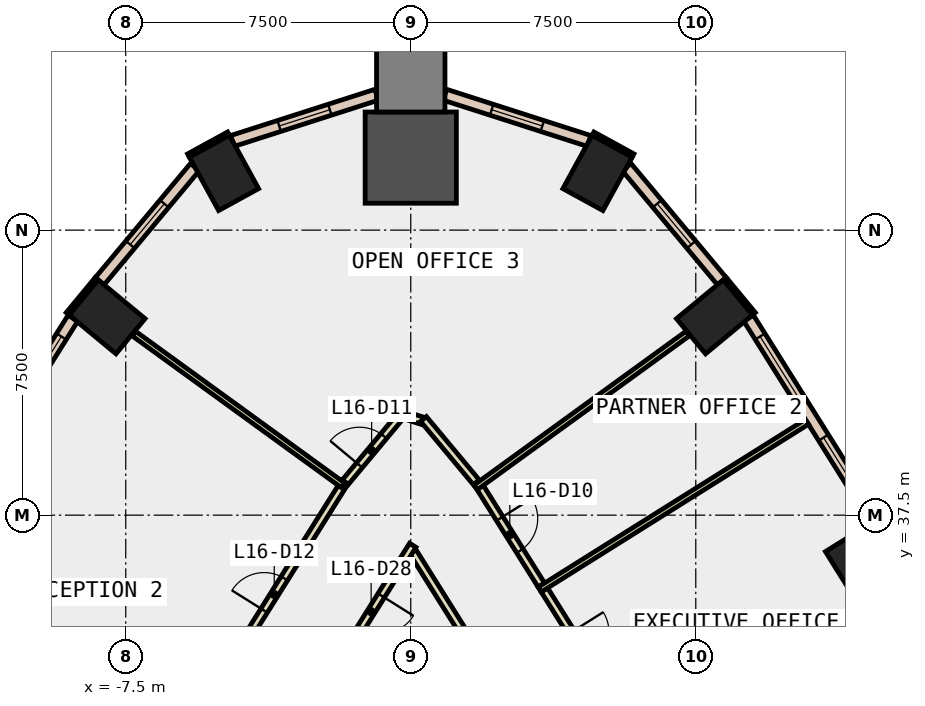
"""IFC4 building model, lengths in metres.
Left out: names, types, materials, properties, quantities, classifications, styles, units other than length and angle.
Written with IfcOpenShell. Run it as: python <this file> out.ifc"""

import sys

from ifc_helpers import new_model, si_unit, direction, frame, frame_2d, origin, origin_2d, place, context, subcontext, project, spatial, rectangle, extrude, element, fill, save


model = new_model("IFC4")
c1 = context("Model", 3, precision=1e-05, world=origin(), true_north=direction((0.0, 1.0)))
c2 = subcontext(c1, "Body", "Model", "MODEL_VIEW")
j1 = project(units=[si_unit("LENGTHUNIT", "METRE"), si_unit("PLANEANGLEUNIT", "RADIAN")], contexts=[c1])
p1 = place(None, origin())
s1 = spatial("IfcSite", under=j1, at=p1, CompositionType="ELEMENT")
p2 = place(p1, origin())
s2 = spatial("IfcBuilding", under=s1, at=p2, CompositionType="ELEMENT")
p3 = place(p2, frame((0.0, 0.0, 77.0)))
s3 = spatial("IfcBuildingStorey", under=s2, at=p3, CompositionType="ELEMENT", Elevation=77.0)
for number, where, z_axis, x_axis in (
    (1, (11.909, 36.457, -0.4), (0.0, 0.0, 1.0), (-0.53, 0.848, 0.0)),
    (2, (7.991, 42.718, -0.4), (0.0, 0.0, 1.0), (-0.638, 0.77, 0.0)),
    (3, (4.914, 46.505, -0.4), (0.0, 0.0, 1.0), (-0.877, 0.48, 0.0)),
):
    element("IfcColumn", number, at=place(p3, frame(where, z_axis=z_axis, x_axis=x_axis)), inside=s3, PredefinedType="COLUMN", context=c2, shape_type="SweptSolid", body=[
        extrude(rectangle(XDim=1.2, YDim=1.6, at=origin_2d()), origin(), (0.0, 0.0, 1.0), 4.0),
    ])
p4 = place(p3, frame((0.0, 46.908, -0.4), z_axis=(0.0, 0.0, 1.0), x_axis=(0.0, 1.0, 0.0)))
e4 = element("IfcColumn", 4, at=p4, inside=s3, PredefinedType="COLUMN", context=c2, shape_type="SweptSolid", body=[
    extrude(rectangle(XDim=2.4, YDim=2.4, at=origin_2d()), origin(), (0.0, 0.0, 1.0), 4.0),
])
for number, where, z_axis, x_axis in (
    (5, (-4.914, 46.505, -0.4), (0.0, 0.0, 1.0), (0.877, 0.48, 0.0)),
    (6, (-7.991, 42.718, -0.4), (0.0, 0.0, 1.0), (0.638, 0.77, 0.0)),
):
    element("IfcColumn", number, at=place(p3, frame(where, z_axis=z_axis, x_axis=x_axis)), inside=s3, PredefinedType="COLUMN", context=c2, shape_type="SweptSolid", body=[
        extrude(rectangle(XDim=1.2, YDim=1.6, at=origin_2d()), origin(), (0.0, 0.0, 1.0), 4.0),
    ])
p5 = place(p3, frame((0.0, 49.008, -0.4), z_axis=(0.0, 0.0, 1.0), x_axis=(0.0, 1.0, 0.0)))
e7 = element("IfcColumn", 7, at=p5, inside=s3, PredefinedType="COLUMN", context=c2, shape_type="SweptSolid", body=[
    extrude(rectangle(XDim=1.8, YDim=1.8, at=origin_2d()), origin(), (0.0, 0.0, 1.0), 4.0),
])
for number, where, z_axis, x_axis in (
    (8, (5.848, 46.962, 0.0), (0.0, 0.0, 1.0), (-0.877, 0.48, 0.0)),
    (9, (-4.796, 47.538, 0.0), (0.0, 0.0, 1.0), (-0.877, -0.48, 0.0)),
    (10, (9.028, 42.798, 0.0), (0.0, 0.0, 1.0), (-0.638, 0.77, 0.0)),
    (11, (-8.263, 43.722, 0.0), (0.0, 0.0, 1.0), (-0.638, -0.77, 0.0)),
):
    element("IfcWall", number, at=place(p3, frame(where, z_axis=z_axis, x_axis=x_axis)), inside=s3, PredefinedType="STANDARD", context=c2, shape_type="SweptSolid", body=[
        extrude(rectangle(XDim=1.199, YDim=0.1, at=frame_2d((0.6, 0.0))), origin(), (0.0, 0.0, 1.0), 3.6),
    ])
p6 = place(p3, frame((12.227, 37.362, 0.0), z_axis=(0.0, 0.0, 1.0), x_axis=(-0.531357111884, 0.847147932565, 0.0)))
e12 = element("IfcWall", 12, at=p6, inside=s3, PredefinedType="STANDARD", context=c2, shape_type="SweptSolid", body=[
    extrude(rectangle(XDim=6.282, YDim=0.3, at=frame_2d((3.141, 0.0))), origin(), (0.0, 0.0, 1.0), 3.6),
])
p7 = place(p6, frame((0.571, 0.0, 0.9)))
e13 = element("IfcOpeningElement", 13, at=p7, cuts=e12, PredefinedType="OPENING", context=c2, shape_type="SweptSolid", body=[
    extrude(rectangle(XDim=2.0, YDim=2.6, at=frame_2d((1.0, 1.3))), frame((0.0, 0.16, 0.0), z_axis=(0.0, -1.0, 0.0), x_axis=(1.0, 0.0, 0.0)), (0.0, 0.0, 1.0), 0.32),
])
p8 = place(p6, frame((3.712, 0.0, 0.9)))
e14 = element("IfcOpeningElement", 14, at=p8, cuts=e12, PredefinedType="OPENING", context=c2, shape_type="SweptSolid", body=[
    extrude(rectangle(XDim=2.0, YDim=2.6, at=frame_2d((1.0, 1.3))), frame((0.0, 0.16, 0.0), z_axis=(0.0, -1.0, 0.0), x_axis=(1.0, 0.0, 0.0)), (0.0, 0.0, 1.0), 0.32),
])
p9 = place(p3, frame((8.185, 43.656, 0.0), z_axis=(0.0, 0.0, 1.0), x_axis=(-0.640565172846, 0.767903808649, 0.0)))
e15 = element("IfcWall", 15, at=p9, inside=s3, PredefinedType="STANDARD", context=c2, shape_type="SweptSolid", body=[
    extrude(rectangle(XDim=3.909, YDim=0.3, at=frame_2d((1.955, 0.0))), origin(), (0.0, 0.0, 1.0), 3.6),
])
p10 = place(p9, frame((1.255, 0.0, 0.9)))
e16 = element("IfcOpeningElement", 16, at=p10, cuts=e15, PredefinedType="OPENING", context=c2, shape_type="SweptSolid", body=[
    extrude(rectangle(XDim=1.4, YDim=2.6, at=frame_2d((0.7, 1.3))), frame((0.0, 0.16, 0.0), z_axis=(0.0, -1.0, 0.0), x_axis=(1.0, 0.0, 0.0)), (0.0, 0.0, 1.0), 0.32),
])
p11 = place(p3, frame((4.692, 47.346, 0.0), z_axis=(0.0, 0.0, 1.0), x_axis=(-0.95225533311, 0.30530276868, 0.0)))
e17 = element("IfcWall", 17, at=p11, inside=s3, PredefinedType="STANDARD", context=c2, shape_type="SweptSolid", body=[
    extrude(rectangle(XDim=3.983, YDim=0.3, at=frame_2d((1.992, 0.0))), origin(), (0.0, 0.0, 1.0), 3.6),
])
p12 = place(p11, frame((1.292, 0.0, 0.9)))
e18 = element("IfcOpeningElement", 18, at=p12, cuts=e17, PredefinedType="OPENING", context=c2, shape_type="SweptSolid", body=[
    extrude(rectangle(XDim=1.4, YDim=2.6, at=frame_2d((0.7, 1.3))), frame((0.0, 0.16, 0.0), z_axis=(0.0, -1.0, 0.0), x_axis=(1.0, 0.0, 0.0)), (0.0, 0.0, 1.0), 0.32),
])
p13 = place(p3, frame((-0.899, 48.562, 0.0), z_axis=(0.0, 0.0, 1.0), x_axis=(-0.95225533311, -0.30530276868, 0.0)))
e19 = element("IfcWall", 19, at=p13, inside=s3, PredefinedType="STANDARD", context=c2, shape_type="SweptSolid", body=[
    extrude(rectangle(XDim=3.983, YDim=0.3, at=frame_2d((1.992, 0.0))), origin(), (0.0, 0.0, 1.0), 3.6),
])
p14 = place(p13, frame((1.292, 0.0, 0.9)))
e20 = element("IfcOpeningElement", 20, at=p14, cuts=e19, PredefinedType="OPENING", context=c2, shape_type="SweptSolid", body=[
    extrude(rectangle(XDim=1.4, YDim=2.6, at=frame_2d((0.7, 1.3))), frame((0.0, 0.16, 0.0), z_axis=(0.0, -1.0, 0.0), x_axis=(1.0, 0.0, 0.0)), (0.0, 0.0, 1.0), 0.32),
])
p15 = place(p3, frame((-5.681, 46.658, 0.0), z_axis=(0.0, 0.0, 1.0), x_axis=(-0.640565172846, -0.767903808649, 0.0)))
e21 = element("IfcWall", 21, at=p15, inside=s3, PredefinedType="STANDARD", context=c2, shape_type="SweptSolid", body=[
    extrude(rectangle(XDim=3.909, YDim=0.3, at=frame_2d((1.955, 0.0))), origin(), (0.0, 0.0, 1.0), 3.6),
])
p16 = place(p15, frame((1.255, 0.0, 0.9)))
e22 = element("IfcOpeningElement", 22, at=p16, cuts=e21, PredefinedType="OPENING", context=c2, shape_type="SweptSolid", body=[
    extrude(rectangle(XDim=1.4, YDim=2.6, at=frame_2d((0.7, 1.3))), frame((0.0, 0.16, 0.0), z_axis=(0.0, -1.0, 0.0), x_axis=(1.0, 0.0, 0.0)), (0.0, 0.0, 1.0), 0.32),
])
p17 = place(p3, frame((-8.889, 42.684, 0.0), z_axis=(0.0, 0.0, 1.0), x_axis=(-0.531357111884, -0.847147932565, 0.0)))
e23 = element("IfcWall", 23, at=p17, inside=s3, PredefinedType="STANDARD", context=c2, shape_type="SweptSolid", body=[
    extrude(rectangle(XDim=6.282, YDim=0.3, at=frame_2d((3.141, 0.0))), origin(), (0.0, 0.0, 1.0), 3.6),
])
p18 = place(p17, frame((0.571, 0.0, 0.9)))
e24 = element("IfcOpeningElement", 24, at=p18, cuts=e23, PredefinedType="OPENING", context=c2, shape_type="SweptSolid", body=[
    extrude(rectangle(XDim=2.0, YDim=2.6, at=frame_2d((1.0, 1.3))), frame((0.0, 0.16, 0.0), z_axis=(0.0, -1.0, 0.0), x_axis=(1.0, 0.0, 0.0)), (0.0, 0.0, 1.0), 0.32),
])
p19 = place(p17, frame((3.712, 0.0, 0.9)))
e25 = element("IfcOpeningElement", 25, at=p19, cuts=e23, PredefinedType="OPENING", context=c2, shape_type="SweptSolid", body=[
    extrude(rectangle(XDim=2.0, YDim=2.6, at=frame_2d((1.0, 1.3))), frame((0.0, 0.16, 0.0), z_axis=(0.0, -1.0, 0.0), x_axis=(1.0, 0.0, 0.0)), (0.0, 0.0, 1.0), 0.32),
])
p20 = place(p3, frame((2.031, 33.385, 0.0), z_axis=(0.0, 0.0, 1.0), x_axis=(-0.53130100335, 0.847183122967, 0.0)))
e26 = element("IfcWall", 26, at=p20, inside=s3, PredefinedType="PARTITIONING", context=c2, shape_type="SweptSolid", body=[
    extrude(rectangle(XDim=3.723, YDim=0.2, at=frame_2d((1.861, 0.0))), origin(), (0.0, 0.0, 1.0), 3.6),
])
p21 = place(p3, frame((0.053, 36.708, 0.0), z_axis=(0.0, 0.0, 1.0), x_axis=(-0.53130190932, -0.847182554797, 0.0)))
e27 = element("IfcWall", 27, at=p21, inside=s3, PredefinedType="PARTITIONING", context=c2, shape_type="SweptSolid", body=[
    extrude(rectangle(XDim=3.922, YDim=0.2, at=frame_2d((1.961, 0.0))), origin(), (0.0, 0.0, 1.0), 3.6),
])
p22 = place(p21, frame((1.562, 0.0, 0.0)))
e28 = element("IfcOpeningElement", 28, at=p22, cuts=e27, PredefinedType="OPENING", context=c2, shape_type="SweptSolid", body=[
    extrude(rectangle(XDim=1.0, YDim=2.1, at=frame_2d((0.5, 1.05))), frame((0.0, 0.11, 0.0), z_axis=(0.0, -1.0, 0.0), x_axis=(1.0, 0.0, 0.0)), (0.0, 0.0, 1.0), 0.22),
])
p23 = place(p3, frame((3.517, 35.533, 0.0), z_axis=(0.0, 0.0, 1.0), x_axis=(0.531301282969, -0.847182947607, 0.0)))
e29 = element("IfcWall", 29, at=p23, inside=s3, PredefinedType="PARTITIONING", context=c2, shape_type="SweptSolid", body=[
    extrude(rectangle(XDim=3.638, YDim=0.2, at=frame_2d((1.819, 0.0))), origin(), (0.0, 0.0, 1.0), 3.6),
])
p24 = place(p23, frame((1.319, 0.0, 0.0)))
e30 = element("IfcOpeningElement", 30, at=p24, cuts=e29, PredefinedType="OPENING", context=c2, shape_type="SweptSolid", body=[
    extrude(rectangle(XDim=1.0, YDim=2.1, at=frame_2d((0.5, 1.05))), frame((0.0, 0.11, 0.0), z_axis=(0.0, -1.0, 0.0), x_axis=(1.0, 0.0, 0.0)), (0.0, 0.0, 1.0), 0.22),
])
p25 = place(p3, frame((1.775, 38.31, 0.0), z_axis=(0.0, 0.0, 1.0), x_axis=(0.531324164807, -0.847168597088, 0.0)))
e31 = element("IfcWall", 31, at=p25, inside=s3, PredefinedType="PARTITIONING", context=c2, shape_type="SweptSolid", body=[
    extrude(rectangle(XDim=3.128, YDim=0.2, at=frame_2d((1.564, 0.0))), origin(), (0.0, 0.0, 1.0), 3.6),
])
p26 = place(p25, frame((1.064, 0.0, 0.0)))
e32 = element("IfcOpeningElement", 32, at=p26, cuts=e31, PredefinedType="OPENING", context=c2, shape_type="SweptSolid", body=[
    extrude(rectangle(XDim=1.0, YDim=2.1, at=frame_2d((0.5, 1.05))), frame((0.0, 0.11, 0.0), z_axis=(0.0, -1.0, 0.0), x_axis=(1.0, 0.0, 0.0)), (0.0, 0.0, 1.0), 0.22),
])
p27 = place(p3, frame((-1.724, 38.365, 0.0), z_axis=(0.0, 0.0, 1.0), x_axis=(0.64036162185, 0.768073559799, 0.0)))
e33 = element("IfcWall", 33, at=p27, inside=s3, PredefinedType="PARTITIONING", context=c2, shape_type="SweptSolid", body=[
    extrude(rectangle(XDim=2.168, YDim=0.2, at=frame_2d((1.084, 0.0))), origin(), (0.0, 0.0, 1.0), 3.6),
])
p28 = place(p27, frame((0.584, 0.0, 0.0)))
e34 = element("IfcOpeningElement", 34, at=p28, cuts=e33, PredefinedType="OPENING", context=c2, shape_type="SweptSolid", body=[
    extrude(rectangle(XDim=1.0, YDim=2.1, at=frame_2d((0.5, 1.05))), frame((0.0, 0.11, 0.0), z_axis=(0.0, -1.0, 0.0), x_axis=(1.0, 0.0, 0.0)), (0.0, 0.0, 1.0), 0.22),
])
p29 = place(p3, frame((-0.095, 40.112, 0.0), z_axis=(0.0, 0.0, 1.0), x_axis=(0.952282288042, -0.305218682065, 0.0)))
e35 = element("IfcWall", 35, at=p29, inside=s3, PredefinedType="PARTITIONING", context=c2, shape_type="SweptSolid", body=[
    extrude(rectangle(XDim=0.42, YDim=0.2, at=frame_2d((0.21, 0.0))), origin(), (0.0, 0.0, 1.0), 3.6),
])
p30 = place(p3, frame((0.336, 40.03, 0.0), z_axis=(0.0, 0.0, 1.0), x_axis=(0.64036162185, -0.768073559799, 0.0)))
e36 = element("IfcWall", 36, at=p30, inside=s3, PredefinedType="PARTITIONING", context=c2, shape_type="SweptSolid", body=[
    extrude(rectangle(XDim=2.168, YDim=0.2, at=frame_2d((1.084, 0.0))), origin(), (0.0, 0.0, 1.0), 3.6),
])
p31 = place(p3, frame((-5.45, 32.451, 0.0), z_axis=(0.0, 0.0, 1.0), x_axis=(0.531388870359, 0.847128011849, 0.0)))
e37 = element("IfcWall", 37, at=p31, inside=s3, PredefinedType="PARTITIONING", context=c2, shape_type="SweptSolid", body=[
    extrude(rectangle(XDim=6.991, YDim=0.2, at=frame_2d((3.495, 0.0))), origin(), (0.0, 0.0, 1.0), 3.6),
])
p32 = place(p31, frame((2.996, 0.0, 0.0)))
e38 = element("IfcOpeningElement", 38, at=p32, cuts=e37, PredefinedType="OPENING", context=c2, shape_type="SweptSolid", body=[
    extrude(rectangle(XDim=1.0, YDim=2.1, at=frame_2d((0.5, 1.05))), frame((0.0, 0.11, 0.0), z_axis=(0.0, -1.0, 0.0), x_axis=(1.0, 0.0, 0.0)), (0.0, 0.0, 1.0), 0.22),
])
p33 = place(p3, frame((3.393, 35.543, 0.0), z_axis=(0.0, 0.0, 1.0), x_axis=(0.847089858839, 0.531449688166, 0.0)))
e39 = element("IfcWall", 39, at=p33, inside=s3, PredefinedType="PARTITIONING", context=c2, shape_type="SweptSolid", body=[
    extrude(rectangle(XDim=8.3, YDim=0.15, at=frame_2d((4.15, 0.0))), origin(), (0.0, 0.0, 1.0), 3.6),
])
p34 = place(p3, frame((1.708, 38.23, 0.0), z_axis=(0.0, 0.0, 1.0), x_axis=(0.809349578957, 0.58732721633, 0.0)))
e40 = element("IfcWall", 40, at=p34, inside=s3, PredefinedType="PARTITIONING", context=c2, shape_type="SweptSolid", body=[
    extrude(rectangle(XDim=6.896, YDim=0.15, at=frame_2d((3.448, 0.0))), origin(), (0.0, 0.0, 1.0), 3.6),
])
p35 = place(p3, frame((-1.788, 38.289, 0.0), z_axis=(0.0, 0.0, 1.0), x_axis=(-0.809417495555, 0.587233614408, 0.0)))
e41 = element("IfcWall", 41, at=p35, inside=s3, PredefinedType="PARTITIONING", context=c2, shape_type="SweptSolid", body=[
    extrude(rectangle(XDim=6.796, YDim=0.15, at=frame_2d((3.398, 0.0))), origin(), (0.0, 0.0, 1.0), 3.6),
])
p36 = place(p7, origin())
e42 = element("IfcWindow", 42, at=p36, inside=s3, PartitioningType="SINGLE_PANEL", PredefinedType="WINDOW", context=c2, shape_type="SweptSolid", body=[
    extrude(rectangle(XDim=2.0, YDim=2.6, at=frame_2d((1.0, 1.3))), frame((0.0, 0.03, 0.0), z_axis=(0.0, -1.0, 0.0), x_axis=(1.0, 0.0, 0.0)), (0.0, 0.0, 1.0), 0.06),
])
fill(e13, e42)
p37 = place(p8, origin())
e43 = element("IfcWindow", 43, at=p37, inside=s3, PartitioningType="SINGLE_PANEL", PredefinedType="WINDOW", context=c2, shape_type="SweptSolid", body=[
    extrude(rectangle(XDim=2.0, YDim=2.6, at=frame_2d((1.0, 1.3))), frame((0.0, 0.03, 0.0), z_axis=(0.0, -1.0, 0.0), x_axis=(1.0, 0.0, 0.0)), (0.0, 0.0, 1.0), 0.06),
])
fill(e14, e43)
p38 = place(p10, origin())
e44 = element("IfcWindow", 44, at=p38, inside=s3, PartitioningType="SINGLE_PANEL", PredefinedType="WINDOW", context=c2, shape_type="SweptSolid", body=[
    extrude(rectangle(XDim=1.4, YDim=2.6, at=frame_2d((0.7, 1.3))), frame((0.0, 0.03, 0.0), z_axis=(0.0, -1.0, 0.0), x_axis=(1.0, 0.0, 0.0)), (0.0, 0.0, 1.0), 0.06),
])
fill(e16, e44)
p39 = place(p12, origin())
e45 = element("IfcWindow", 45, at=p39, inside=s3, PartitioningType="SINGLE_PANEL", PredefinedType="WINDOW", context=c2, shape_type="SweptSolid", body=[
    extrude(rectangle(XDim=1.4, YDim=2.6, at=frame_2d((0.7, 1.3))), frame((0.0, 0.03, 0.0), z_axis=(0.0, -1.0, 0.0), x_axis=(1.0, 0.0, 0.0)), (0.0, 0.0, 1.0), 0.06),
])
fill(e18, e45)
p40 = place(p14, origin())
e46 = element("IfcWindow", 46, at=p40, inside=s3, PartitioningType="SINGLE_PANEL", PredefinedType="WINDOW", context=c2, shape_type="SweptSolid", body=[
    extrude(rectangle(XDim=1.4, YDim=2.6, at=frame_2d((0.7, 1.3))), frame((0.0, 0.03, 0.0), z_axis=(0.0, -1.0, 0.0), x_axis=(1.0, 0.0, 0.0)), (0.0, 0.0, 1.0), 0.06),
])
fill(e20, e46)
p41 = place(p16, origin())
e47 = element("IfcWindow", 47, at=p41, inside=s3, PartitioningType="SINGLE_PANEL", PredefinedType="WINDOW", context=c2, shape_type="SweptSolid", body=[
    extrude(rectangle(XDim=1.4, YDim=2.6, at=frame_2d((0.7, 1.3))), frame((0.0, 0.03, 0.0), z_axis=(0.0, -1.0, 0.0), x_axis=(1.0, 0.0, 0.0)), (0.0, 0.0, 1.0), 0.06),
])
fill(e22, e47)
p42 = place(p18, origin())
e48 = element("IfcWindow", 48, at=p42, inside=s3, PartitioningType="SINGLE_PANEL", PredefinedType="WINDOW", context=c2, shape_type="SweptSolid", body=[
    extrude(rectangle(XDim=2.0, YDim=2.6, at=frame_2d((1.0, 1.3))), frame((0.0, 0.03, 0.0), z_axis=(0.0, -1.0, 0.0), x_axis=(1.0, 0.0, 0.0)), (0.0, 0.0, 1.0), 0.06),
])
fill(e24, e48)
p43 = place(p26, origin())
e49 = element("IfcDoor", 49, at=p43, inside=s3, OperationType="SINGLE_SWING_LEFT", PredefinedType="DOOR", context=c2, shape_type="SweptSolid", body=[
    extrude(rectangle(XDim=1.0, YDim=2.1, at=frame_2d((0.5, 1.05))), frame((0.0, 0.025, 0.0), z_axis=(0.0, -1.0, 0.0), x_axis=(1.0, 0.0, 0.0)), (0.0, 0.0, 1.0), 0.05),
])
fill(e32, e49)
p44 = place(p28, origin())
e50 = element("IfcDoor", 50, at=p44, inside=s3, OperationType="SINGLE_SWING_LEFT", PredefinedType="DOOR", context=c2, shape_type="SweptSolid", body=[
    extrude(rectangle(XDim=1.0, YDim=2.1, at=frame_2d((0.5, 1.05))), frame((0.0, 0.025, 0.0), z_axis=(0.0, -1.0, 0.0), x_axis=(1.0, 0.0, 0.0)), (0.0, 0.0, 1.0), 0.05),
])
fill(e34, e50)
p45 = place(p32, origin())
e51 = element("IfcDoor", 51, at=p45, inside=s3, OperationType="SINGLE_SWING_LEFT", PredefinedType="DOOR", context=c2, shape_type="SweptSolid", body=[
    extrude(rectangle(XDim=1.0, YDim=2.1, at=frame_2d((0.5, 1.05))), frame((0.0, 0.025, 0.0), z_axis=(0.0, -1.0, 0.0), x_axis=(1.0, 0.0, 0.0)), (0.0, 0.0, 1.0), 0.05),
])
fill(e38, e51)
p46 = place(p22, origin())
e52 = element("IfcDoor", 52, at=p46, inside=s3, OperationType="SINGLE_SWING_LEFT", PredefinedType="DOOR", context=c2, shape_type="SweptSolid", body=[
    extrude(rectangle(XDim=1.0, YDim=2.1, at=frame_2d((0.5, 1.05))), frame((0.0, 0.025, 0.0), z_axis=(0.0, -1.0, 0.0), x_axis=(1.0, 0.0, 0.0)), (0.0, 0.0, 1.0), 0.05),
])
fill(e28, e52)
save(model, sys.argv[1])
